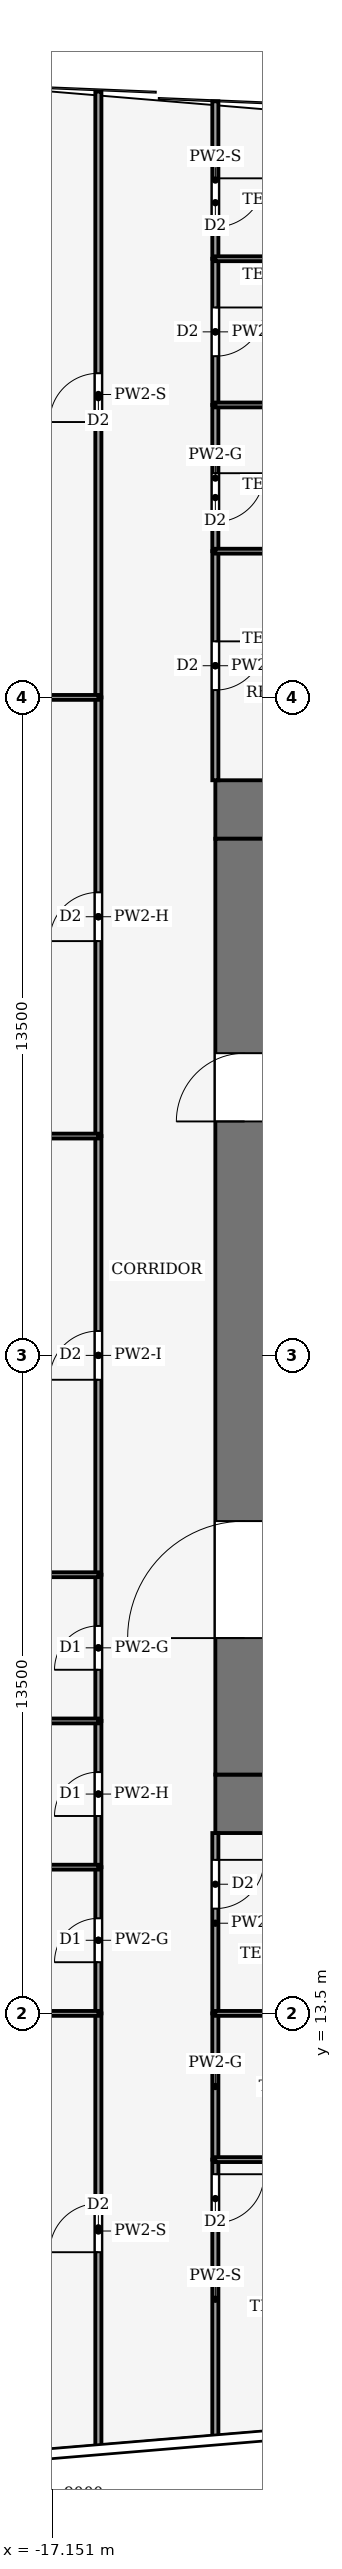
"""IFC4 building model, lengths in metres.
Left out: names, types, materials, properties, quantities, classifications, styles, units other than length and angle.
Written with IfcOpenShell. Run it as: python <this file> out.ifc"""

import sys

from ifc_helpers import new_model, si_unit, direction, frame, frame_2d, origin, place, context, subcontext, project, spatial, rectangle, extrude, element, fill, save


model = new_model("IFC4")
c1 = context("Model", 3, precision=1e-05, world=origin(), true_north=direction((0.0, 1.0)))
c2 = subcontext(c1, "Body", "Model", "MODEL_VIEW")
j1 = project(units=[si_unit("LENGTHUNIT", "METRE"), si_unit("PLANEANGLEUNIT", "RADIAN")], contexts=[c1])
p1 = place(None, origin())
s1 = spatial("IfcSite", under=j1, at=p1, CompositionType="ELEMENT")
p2 = place(p1, origin())
s2 = spatial("IfcBuilding", under=s1, at=p2, CompositionType="ELEMENT")
p3 = place(p2, frame((0.0, 0.0, 106.0)))
s3 = spatial("IfcBuildingStorey", under=s2, at=p3, CompositionType="ELEMENT", Elevation=106.0)
for number, where, z_axis, x_axis in (
    (1, (-13.8, 17.8, -0.13), (0.0, 0.0, 1.0), (1.0, 0.0, 0.0)),
    (2, (-13.8, 38.2, -0.13), (0.0, 0.0, 1.0), (1.0, 0.0, 0.0)),
):
    element("IfcWall", number, at=place(p3, frame(where, z_axis=z_axis, x_axis=x_axis)), inside=s3, PredefinedType="SHEAR", context=c2, shape_type="SweptSolid", body=[
        extrude(rectangle(XDim=27.6, YDim=1.2, at=frame_2d((13.8, 0.0))), origin(), (0.0, 0.0, 1.0), 4.0),
    ])
p4 = place(p3, frame((-13.2, 18.4, -0.13), z_axis=(0.0, 0.0, 1.0), x_axis=(0.0, 1.0, 0.0)))
e3 = element("IfcWall", 3, at=p4, inside=s3, PredefinedType="SHEAR", context=c2, shape_type="SweptSolid", body=[
    extrude(rectangle(XDim=19.2, YDim=1.2, at=frame_2d((9.6, 0.0))), origin(), (0.0, 0.0, 1.0), 4.0),
])
p5 = place(p4, frame((2.8, 0.0, 0.13)))
e4 = element("IfcOpeningElement", 4, at=p5, cuts=e3, PredefinedType="OPENING", context=c2, shape_type="SweptSolid", body=[
    extrude(rectangle(XDim=2.4, YDim=2.4, at=frame_2d((1.2, 1.2))), frame((0.0, 0.61, 0.0), z_axis=(0.0, -1.0, 0.0), x_axis=(1.0, 0.0, 0.0)), (0.0, 0.0, 1.0), 1.22),
])
p6 = place(p4, frame((13.4, 0.0, 0.13)))
e5 = element("IfcOpeningElement", 5, at=p6, cuts=e3, PredefinedType="OPENING", context=c2, shape_type="SweptSolid", body=[
    extrude(rectangle(XDim=1.4, YDim=2.2, at=frame_2d((0.7, 1.1))), frame((0.0, 0.61, 0.0), z_axis=(0.0, -1.0, 0.0), x_axis=(1.0, 0.0, 0.0)), (0.0, 0.0, 1.0), 1.22),
])
p7 = place(p3, frame((-16.2, 4.57, 0.0), z_axis=(0.0, 0.0, 1.0), x_axis=(0.0, 1.0, 0.0)))
e6 = element("IfcWall", 6, at=p7, inside=s3, PredefinedType="PARTITIONING", context=c2, shape_type="SweptSolid", body=[
    extrude(rectangle(XDim=8.93, YDim=0.125, at=frame_2d((4.465, 0.0))), origin(), (0.0, 0.0, 1.0), 3.04),
])
p8 = place(p7, frame((4.03, 0.0, 0.0)))
e7 = element("IfcOpeningElement", 7, at=p8, cuts=e6, PredefinedType="OPENING", context=c2, shape_type="SweptSolid", body=[
    extrude(rectangle(XDim=1.0, YDim=2.1, at=frame_2d((0.5, 1.05))), frame((0.0, 0.073, 0.0), z_axis=(0.0, -1.0, 0.0), x_axis=(1.0, 0.0, 0.0)), (0.0, 0.0, 1.0), 0.145),
])
p9 = place(p3, frame((-16.2, 13.5, 0.0), z_axis=(0.0, 0.0, 1.0), x_axis=(0.0, 1.0, 0.0)))
e8 = element("IfcWall", 8, at=p9, inside=s3, PredefinedType="PARTITIONING", context=c2, shape_type="SweptSolid", body=[
    extrude(rectangle(XDim=3.0, YDim=0.125, at=frame_2d((1.5, 0.0))), origin(), (0.0, 0.0, 1.0), 3.87),
])
p10 = place(p9, frame((1.05, 0.0, 0.0)))
e9 = element("IfcOpeningElement", 9, at=p10, cuts=e8, PredefinedType="OPENING", context=c2, shape_type="SweptSolid", body=[
    extrude(rectangle(XDim=0.9, YDim=2.1, at=frame_2d((0.45, 1.05))), frame((0.0, 0.073, 0.0), z_axis=(0.0, -1.0, 0.0), x_axis=(1.0, 0.0, 0.0)), (0.0, 0.0, 1.0), 0.145),
])
p11 = place(p3, frame((-16.2, 16.5, 0.0), z_axis=(0.0, 0.0, 1.0), x_axis=(0.0, 1.0, 0.0)))
e10 = element("IfcWall", 10, at=p11, inside=s3, PredefinedType="PARTITIONING", context=c2, shape_type="SweptSolid", body=[
    extrude(rectangle(XDim=3.0, YDim=0.125, at=frame_2d((1.5, 0.0))), origin(), (0.0, 0.0, 1.0), 3.14),
])
p12 = place(p11, frame((1.05, 0.0, 0.0)))
e11 = element("IfcOpeningElement", 11, at=p12, cuts=e10, PredefinedType="OPENING", context=c2, shape_type="SweptSolid", body=[
    extrude(rectangle(XDim=0.9, YDim=2.1, at=frame_2d((0.45, 1.05))), frame((0.0, 0.073, 0.0), z_axis=(0.0, -1.0, 0.0), x_axis=(1.0, 0.0, 0.0)), (0.0, 0.0, 1.0), 0.145),
])
p13 = place(p3, frame((-16.2, 19.5, 0.0), z_axis=(0.0, 0.0, 1.0), x_axis=(0.0, 1.0, 0.0)))
e12 = element("IfcWall", 12, at=p13, inside=s3, PredefinedType="PARTITIONING", context=c2, shape_type="SweptSolid", body=[
    extrude(rectangle(XDim=3.0, YDim=0.125, at=frame_2d((1.5, 0.0))), origin(), (0.0, 0.0, 1.0), 3.87),
])
p14 = place(p13, frame((1.05, 0.0, 0.0)))
e13 = element("IfcOpeningElement", 13, at=p14, cuts=e12, PredefinedType="OPENING", context=c2, shape_type="SweptSolid", body=[
    extrude(rectangle(XDim=0.9, YDim=2.1, at=frame_2d((0.45, 1.05))), frame((0.0, 0.073, 0.0), z_axis=(0.0, -1.0, 0.0), x_axis=(1.0, 0.0, 0.0)), (0.0, 0.0, 1.0), 0.145),
])
p15 = place(p3, frame((-16.2, 22.5, 0.0), z_axis=(0.0, 0.0, 1.0), x_axis=(0.0, 1.0, 0.0)))
e14 = element("IfcWall", 14, at=p15, inside=s3, PredefinedType="PARTITIONING", context=c2, shape_type="SweptSolid", body=[
    extrude(rectangle(XDim=9.0, YDim=0.125, at=frame_2d((4.5, 0.0))), origin(), (0.0, 0.0, 1.0), 3.48),
])
p16 = place(p15, frame((4.0, 0.0, 0.0)))
e15 = element("IfcOpeningElement", 15, at=p16, cuts=e14, PredefinedType="OPENING", context=c2, shape_type="SweptSolid", body=[
    extrude(rectangle(XDim=1.0, YDim=2.1, at=frame_2d((0.5, 1.05))), frame((0.0, 0.073, 0.0), z_axis=(0.0, -1.0, 0.0), x_axis=(1.0, 0.0, 0.0)), (0.0, 0.0, 1.0), 0.145),
])
p17 = place(p3, frame((-16.2, 31.5, 0.0), z_axis=(0.0, 0.0, 1.0), x_axis=(0.0, 1.0, 0.0)))
e16 = element("IfcWall", 16, at=p17, inside=s3, PredefinedType="PARTITIONING", context=c2, shape_type="SweptSolid", body=[
    extrude(rectangle(XDim=9.0, YDim=0.125, at=frame_2d((4.5, 0.0))), origin(), (0.0, 0.0, 1.0), 3.14),
])
p18 = place(p17, frame((4.0, 0.0, 0.0)))
e17 = element("IfcOpeningElement", 17, at=p18, cuts=e16, PredefinedType="OPENING", context=c2, shape_type="SweptSolid", body=[
    extrude(rectangle(XDim=1.0, YDim=2.1, at=frame_2d((0.5, 1.05))), frame((0.0, 0.073, 0.0), z_axis=(0.0, -1.0, 0.0), x_axis=(1.0, 0.0, 0.0)), (0.0, 0.0, 1.0), 0.145),
])
p19 = place(p3, frame((-16.2, 40.5, 0.0), z_axis=(0.0, 0.0, 1.0), x_axis=(0.0, 1.0, 0.0)))
e18 = element("IfcWall", 18, at=p19, inside=s3, PredefinedType="PARTITIONING", context=c2, shape_type="SweptSolid", body=[
    extrude(rectangle(XDim=12.43, YDim=0.125, at=frame_2d((6.215, 0.0))), origin(), (0.0, 0.0, 1.0), 3.04),
])
p20 = place(p19, frame((5.65, 0.0, 0.0)))
e19 = element("IfcOpeningElement", 19, at=p20, cuts=e18, PredefinedType="OPENING", context=c2, shape_type="SweptSolid", body=[
    extrude(rectangle(XDim=1.0, YDim=2.1, at=frame_2d((0.5, 1.05))), frame((0.0, 0.073, 0.0), z_axis=(0.0, -1.0, 0.0), x_axis=(1.0, 0.0, 0.0)), (0.0, 0.0, 1.0), 0.145),
])
p21 = place(p3, frame((-13.8, 10.5, 0.0), z_axis=(0.0, 0.0, 1.0), x_axis=(0.0, -1.0, 0.0)))
e20 = element("IfcWall", 20, at=p21, inside=s3, PredefinedType="PARTITIONING", context=c2, shape_type="SweptSolid", body=[
    extrude(rectangle(XDim=5.73, YDim=0.125, at=frame_2d((2.865, 0.0))), origin(), (0.0, 0.0, 1.0), 3.04),
])
p22 = place(p21, frame((0.3, 0.0, 0.0)))
e21 = element("IfcOpeningElement", 21, at=p22, cuts=e20, PredefinedType="OPENING", context=c2, shape_type="SweptSolid", body=[
    extrude(rectangle(XDim=1.0, YDim=2.1, at=frame_2d((0.5, 1.05))), frame((0.0, 0.073, 0.0), z_axis=(0.0, -1.0, 0.0), x_axis=(1.0, 0.0, 0.0)), (0.0, 0.0, 1.0), 0.145),
])
p23 = place(p3, frame((-13.8, 10.5, 0.0), z_axis=(0.0, 0.0, 1.0), x_axis=(0.0, 1.0, 0.0)))
e22 = element("IfcWall", 22, at=p23, inside=s3, PredefinedType="PARTITIONING", context=c2, shape_type="SweptSolid", body=[
    extrude(rectangle(XDim=3.0, YDim=0.125, at=frame_2d((1.5, 0.0))), origin(), (0.0, 0.0, 1.0), 3.87),
])
p24 = place(p3, frame((-13.8, 17.2, 0.0), z_axis=(0.0, 0.0, 1.0), x_axis=(0.0, -1.0, 0.0)))
e23 = element("IfcWall", 23, at=p24, inside=s3, PredefinedType="PARTITIONING", context=c2, shape_type="SweptSolid", body=[
    extrude(rectangle(XDim=3.7, YDim=0.125, at=frame_2d((1.85, 0.0))), origin(), (0.0, 0.0, 1.0), 3.14),
])
p25 = place(p24, frame((0.55, 0.0, 0.0)))
e24 = element("IfcOpeningElement", 24, at=p25, cuts=e23, PredefinedType="OPENING", context=c2, shape_type="SweptSolid", body=[
    extrude(rectangle(XDim=1.0, YDim=2.1, at=frame_2d((0.5, 1.05))), frame((0.0, 0.073, 0.0), z_axis=(0.0, -1.0, 0.0), x_axis=(1.0, 0.0, 0.0)), (0.0, 0.0, 1.0), 0.145),
])
p26 = place(p3, frame((-13.8, 43.5, 0.0), z_axis=(0.0, 0.0, 1.0), x_axis=(0.0, -1.0, 0.0)))
e25 = element("IfcWall", 25, at=p26, inside=s3, PredefinedType="PARTITIONING", context=c2, shape_type="SweptSolid", body=[
    extrude(rectangle(XDim=4.7, YDim=0.125, at=frame_2d((2.35, 0.0))), origin(), (0.0, 0.0, 1.0), 3.14),
])
p27 = place(p26, frame((1.85, 0.0, 0.0)))
e26 = element("IfcOpeningElement", 26, at=p27, cuts=e25, PredefinedType="OPENING", context=c2, shape_type="SweptSolid", body=[
    extrude(rectangle(XDim=1.0, YDim=2.1, at=frame_2d((0.5, 1.05))), frame((0.0, 0.073, 0.0), z_axis=(0.0, -1.0, 0.0), x_axis=(1.0, 0.0, 0.0)), (0.0, 0.0, 1.0), 0.145),
])
p28 = place(p3, frame((-13.8, 46.5, 0.0), z_axis=(0.0, 0.0, 1.0), x_axis=(0.0, -1.0, 0.0)))
e27 = element("IfcWall", 27, at=p28, inside=s3, PredefinedType="PARTITIONING", context=c2, shape_type="SweptSolid", body=[
    extrude(rectangle(XDim=3.0, YDim=0.125, at=frame_2d((1.5, 0.0))), origin(), (0.0, 0.0, 1.0), 3.87),
])
p29 = place(p28, frame((1.4, 0.0, 0.0)))
e28 = element("IfcOpeningElement", 28, at=p29, cuts=e27, PredefinedType="OPENING", context=c2, shape_type="SweptSolid", body=[
    extrude(rectangle(XDim=1.0, YDim=2.1, at=frame_2d((0.5, 1.05))), frame((0.0, 0.073, 0.0), z_axis=(0.0, -1.0, 0.0), x_axis=(1.0, 0.0, 0.0)), (0.0, 0.0, 1.0), 0.145),
])
p30 = place(p3, frame((-13.8, 49.5, 0.0), z_axis=(0.0, 0.0, 1.0), x_axis=(0.0, -1.0, 0.0)))
e29 = element("IfcWall", 29, at=p30, inside=s3, PredefinedType="PARTITIONING", context=c2, shape_type="SweptSolid", body=[
    extrude(rectangle(XDim=3.0, YDim=0.125, at=frame_2d((1.5, 0.0))), origin(), (0.0, 0.0, 1.0), 3.87),
])
p31 = place(p30, frame((1.0, 0.0, 0.0)))
e30 = element("IfcOpeningElement", 30, at=p31, cuts=e29, PredefinedType="OPENING", context=c2, shape_type="SweptSolid", body=[
    extrude(rectangle(XDim=1.0, YDim=2.1, at=frame_2d((0.5, 1.05))), frame((0.0, 0.073, 0.0), z_axis=(0.0, -1.0, 0.0), x_axis=(1.0, 0.0, 0.0)), (0.0, 0.0, 1.0), 0.145),
])
p32 = place(p3, frame((-13.8, 52.73, 0.0), z_axis=(0.0, 0.0, 1.0), x_axis=(0.0, -1.0, 0.0)))
e31 = element("IfcWall", 31, at=p32, inside=s3, PredefinedType="PARTITIONING", context=c2, shape_type="SweptSolid", body=[
    extrude(rectangle(XDim=3.23, YDim=0.125, at=frame_2d((1.615, 0.0))), origin(), (0.0, 0.0, 1.0), 3.04),
])
p33 = place(p32, frame((1.58, 0.0, 0.0)))
e32 = element("IfcOpeningElement", 32, at=p33, cuts=e31, PredefinedType="OPENING", context=c2, shape_type="SweptSolid", body=[
    extrude(rectangle(XDim=1.0, YDim=2.1, at=frame_2d((0.5, 1.05))), frame((0.0, 0.073, 0.0), z_axis=(0.0, -1.0, 0.0), x_axis=(1.0, 0.0, 0.0)), (0.0, 0.0, 1.0), 0.145),
])
p34 = place(p3, frame((-16.2, 13.5, 0.0), z_axis=(0.0, 0.0, 1.0), x_axis=(-1.0, 0.0, 0.0)))
e33 = element("IfcWall", 33, at=p34, inside=s3, PredefinedType="PARTITIONING", context=c2, shape_type="SweptSolid", body=[
    extrude(rectangle(XDim=7.634, YDim=0.1, at=frame_2d((3.817, 0.0))), origin(), (0.0, 0.0, 1.0), 3.04),
])
p35 = place(p3, frame((-16.2, 16.5, 0.0), z_axis=(0.0, 0.0, 1.0), x_axis=(-1.0, 0.0, 0.0)))
e34 = element("IfcWall", 34, at=p35, inside=s3, PredefinedType="PARTITIONING", context=c2, shape_type="SweptSolid", body=[
    extrude(rectangle(XDim=7.387, YDim=0.1, at=frame_2d((3.693, 0.0))), origin(), (0.0, 0.0, 1.0), 3.04),
])
p36 = place(p3, frame((-16.2, 19.5, 0.0), z_axis=(0.0, 0.0, 1.0), x_axis=(-1.0, 0.0, 0.0)))
e35 = element("IfcWall", 35, at=p36, inside=s3, PredefinedType="PARTITIONING", context=c2, shape_type="SweptSolid", body=[
    extrude(rectangle(XDim=7.14, YDim=0.1, at=frame_2d((3.57, 0.0))), origin(), (0.0, 0.0, 1.0), 3.04),
])
p37 = place(p3, frame((-16.2, 22.5, 0.0), z_axis=(0.0, 0.0, 1.0), x_axis=(-1.0, 0.0, 0.0)))
e36 = element("IfcWall", 36, at=p37, inside=s3, PredefinedType="PARTITIONING", context=c2, shape_type="SweptSolid", body=[
    extrude(rectangle(XDim=6.894, YDim=0.1, at=frame_2d((3.447, 0.0))), origin(), (0.0, 0.0, 1.0), 3.04),
])
p38 = place(p3, frame((-16.2, 31.5, 0.0), z_axis=(0.0, 0.0, 1.0), x_axis=(-1.0, 0.0, 0.0)))
e37 = element("IfcWall", 37, at=p38, inside=s3, PredefinedType="PARTITIONING", context=c2, shape_type="SweptSolid", body=[
    extrude(rectangle(XDim=6.606, YDim=0.1, at=frame_2d((3.303, 0.0))), origin(), (0.0, 0.0, 1.0), 3.04),
])
p39 = place(p3, frame((-16.2, 40.5, 0.0), z_axis=(0.0, 0.0, 1.0), x_axis=(-1.0, 0.0, 0.0)))
e38 = element("IfcWall", 38, at=p39, inside=s3, PredefinedType="PARTITIONING", context=c2, shape_type="SweptSolid", body=[
    extrude(rectangle(XDim=7.346, YDim=0.1, at=frame_2d((3.673, 0.0))), origin(), (0.0, 0.0, 1.0), 3.04),
])
p40 = place(p3, frame((-13.8, 10.5, 0.0), z_axis=(0.0, 0.0, 1.0), x_axis=(1.0, 0.0, 0.0)))
e39 = element("IfcWall", 39, at=p40, inside=s3, PredefinedType="PARTITIONING", context=c2, shape_type="SweptSolid", body=[
    extrude(rectangle(XDim=6.3, YDim=0.1, at=frame_2d((3.15, 0.0))), origin(), (0.0, 0.0, 1.0), 3.39),
])
p41 = place(p40, frame((2.65, 0.0, 0.0)))
e40 = element("IfcOpeningElement", 40, at=p41, cuts=e39, PredefinedType="OPENING", context=c2, shape_type="SweptSolid", body=[
    extrude(rectangle(XDim=1.0, YDim=2.1, at=frame_2d((0.5, 1.05))), frame((0.0, 0.06, 0.0), z_axis=(0.0, -1.0, 0.0), x_axis=(1.0, 0.0, 0.0)), (0.0, 0.0, 1.0), 0.12),
])
p42 = place(p3, frame((-7.5, 13.5, 0.0), z_axis=(0.0, 0.0, 1.0), x_axis=(-1.0, 0.0, 0.0)))
e41 = element("IfcWall", 41, at=p42, inside=s3, PredefinedType="PARTITIONING", context=c2, shape_type="SweptSolid", body=[
    extrude(rectangle(XDim=6.3, YDim=0.1, at=frame_2d((3.15, 0.0))), origin(), (0.0, 0.0, 1.0), 3.39),
])
for number, where, z_axis, x_axis in (
    (42, (-10.5, 43.5, 0.0), (0.0, 0.0, 1.0), (-1.0, 0.0, 0.0)),
    (43, (-10.5, 46.5, 0.0), (0.0, 0.0, 1.0), (-1.0, 0.0, 0.0)),
    (44, (-10.5, 49.5, 0.0), (0.0, 0.0, 1.0), (-1.0, 0.0, 0.0)),
):
    element("IfcWall", number, at=place(p3, frame(where, z_axis=z_axis, x_axis=x_axis)), inside=s3, PredefinedType="PARTITIONING", context=c2, shape_type="SweptSolid", body=[
        extrude(rectangle(XDim=3.3, YDim=0.1, at=frame_2d((1.65, 0.0))), origin(), (0.0, 0.0, 1.0), 3.39),
    ])
p43 = place(p5, origin())
e45 = element("IfcDoor", 45, at=p43, inside=s3, OperationType="DOUBLE_DOOR_SINGLE_SWING", PredefinedType="DOOR", context=c2, shape_type="SweptSolid", body=[
    extrude(rectangle(XDim=2.4, YDim=2.4, at=frame_2d((1.2, 1.2))), frame((0.0, 0.025, 0.0), z_axis=(0.0, -1.0, 0.0), x_axis=(1.0, 0.0, 0.0)), (0.0, 0.0, 1.0), 0.05),
])
fill(e4, e45)
p44 = place(p6, origin())
e46 = element("IfcDoor", 46, at=p44, inside=s3, OperationType="SINGLE_SWING_RIGHT", PredefinedType="DOOR", context=c2, shape_type="SweptSolid", body=[
    extrude(rectangle(XDim=1.4, YDim=2.2, at=frame_2d((0.7, 1.1))), frame((0.0, 0.025, 0.0), z_axis=(0.0, -1.0, 0.0), x_axis=(1.0, 0.0, 0.0)), (0.0, 0.0, 1.0), 0.05),
])
fill(e5, e46)
p45 = place(p8, origin())
e47 = element("IfcDoor", 47, at=p45, inside=s3, OperationType="SINGLE_SWING_RIGHT", PredefinedType="DOOR", context=c2, shape_type="SweptSolid", body=[
    extrude(rectangle(XDim=1.0, YDim=2.1, at=frame_2d((0.5, 1.05))), frame((0.0, 0.025, 0.0), z_axis=(0.0, -1.0, 0.0), x_axis=(1.0, 0.0, 0.0)), (0.0, 0.0, 1.0), 0.05),
])
fill(e7, e47)
p46 = place(p10, origin())
e48 = element("IfcDoor", 48, at=p46, inside=s3, OperationType="SINGLE_SWING_RIGHT", PredefinedType="DOOR", context=c2, shape_type="SweptSolid", body=[
    extrude(rectangle(XDim=0.9, YDim=2.1, at=frame_2d((0.45, 1.05))), frame((0.0, 0.025, 0.0), z_axis=(0.0, -1.0, 0.0), x_axis=(1.0, 0.0, 0.0)), (0.0, 0.0, 1.0), 0.05),
])
fill(e9, e48)
p47 = place(p12, origin())
e49 = element("IfcDoor", 49, at=p47, inside=s3, OperationType="SINGLE_SWING_LEFT", PredefinedType="DOOR", context=c2, shape_type="SweptSolid", body=[
    extrude(rectangle(XDim=0.9, YDim=2.1, at=frame_2d((0.45, 1.05))), frame((0.0, 0.025, 0.0), z_axis=(0.0, -1.0, 0.0), x_axis=(1.0, 0.0, 0.0)), (0.0, 0.0, 1.0), 0.05),
])
fill(e11, e49)
p48 = place(p14, origin())
e50 = element("IfcDoor", 50, at=p48, inside=s3, OperationType="SINGLE_SWING_RIGHT", PredefinedType="DOOR", context=c2, shape_type="SweptSolid", body=[
    extrude(rectangle(XDim=0.9, YDim=2.1, at=frame_2d((0.45, 1.05))), frame((0.0, 0.025, 0.0), z_axis=(0.0, -1.0, 0.0), x_axis=(1.0, 0.0, 0.0)), (0.0, 0.0, 1.0), 0.05),
])
fill(e13, e50)
p49 = place(p16, origin())
e51 = element("IfcDoor", 51, at=p49, inside=s3, OperationType="SINGLE_SWING_LEFT", PredefinedType="DOOR", context=c2, shape_type="SweptSolid", body=[
    extrude(rectangle(XDim=1.0, YDim=2.1, at=frame_2d((0.5, 1.05))), frame((0.0, 0.025, 0.0), z_axis=(0.0, -1.0, 0.0), x_axis=(1.0, 0.0, 0.0)), (0.0, 0.0, 1.0), 0.05),
])
fill(e15, e51)
p50 = place(p18, origin())
e52 = element("IfcDoor", 52, at=p50, inside=s3, OperationType="SINGLE_SWING_RIGHT", PredefinedType="DOOR", context=c2, shape_type="SweptSolid", body=[
    extrude(rectangle(XDim=1.0, YDim=2.1, at=frame_2d((0.5, 1.05))), frame((0.0, 0.025, 0.0), z_axis=(0.0, -1.0, 0.0), x_axis=(1.0, 0.0, 0.0)), (0.0, 0.0, 1.0), 0.05),
])
fill(e17, e52)
p51 = place(p20, origin())
e53 = element("IfcDoor", 53, at=p51, inside=s3, OperationType="SINGLE_SWING_LEFT", PredefinedType="DOOR", context=c2, shape_type="SweptSolid", body=[
    extrude(rectangle(XDim=1.0, YDim=2.1, at=frame_2d((0.5, 1.05))), frame((0.0, 0.025, 0.0), z_axis=(0.0, -1.0, 0.0), x_axis=(1.0, 0.0, 0.0)), (0.0, 0.0, 1.0), 0.05),
])
fill(e19, e53)
p52 = place(p22, origin())
e54 = element("IfcDoor", 54, at=p52, inside=s3, OperationType="SINGLE_SWING_LEFT", PredefinedType="DOOR", context=c2, shape_type="SweptSolid", body=[
    extrude(rectangle(XDim=1.0, YDim=2.1, at=frame_2d((0.5, 1.05))), frame((0.0, 0.025, 0.0), z_axis=(0.0, -1.0, 0.0), x_axis=(1.0, 0.0, 0.0)), (0.0, 0.0, 1.0), 0.05),
])
fill(e21, e54)
p53 = place(p25, origin())
e55 = element("IfcDoor", 55, at=p53, inside=s3, OperationType="SINGLE_SWING_LEFT", PredefinedType="DOOR", context=c2, shape_type="SweptSolid", body=[
    extrude(rectangle(XDim=1.0, YDim=2.1, at=frame_2d((0.5, 1.05))), frame((0.0, 0.025, 0.0), z_axis=(0.0, -1.0, 0.0), x_axis=(1.0, 0.0, 0.0)), (0.0, 0.0, 1.0), 0.05),
])
fill(e24, e55)
p54 = place(p27, origin())
e56 = element("IfcDoor", 56, at=p54, inside=s3, OperationType="SINGLE_SWING_RIGHT", PredefinedType="DOOR", context=c2, shape_type="SweptSolid", body=[
    extrude(rectangle(XDim=1.0, YDim=2.1, at=frame_2d((0.5, 1.05))), frame((0.0, 0.025, 0.0), z_axis=(0.0, -1.0, 0.0), x_axis=(1.0, 0.0, 0.0)), (0.0, 0.0, 1.0), 0.05),
])
fill(e26, e56)
p55 = place(p29, origin())
e57 = element("IfcDoor", 57, at=p55, inside=s3, OperationType="SINGLE_SWING_RIGHT", PredefinedType="DOOR", context=c2, shape_type="SweptSolid", body=[
    extrude(rectangle(XDim=1.0, YDim=2.1, at=frame_2d((0.5, 1.05))), frame((0.0, 0.025, 0.0), z_axis=(0.0, -1.0, 0.0), x_axis=(1.0, 0.0, 0.0)), (0.0, 0.0, 1.0), 0.05),
])
fill(e28, e57)
p56 = place(p31, origin())
e58 = element("IfcDoor", 58, at=p56, inside=s3, OperationType="SINGLE_SWING_RIGHT", PredefinedType="DOOR", context=c2, shape_type="SweptSolid", body=[
    extrude(rectangle(XDim=1.0, YDim=2.1, at=frame_2d((0.5, 1.05))), frame((0.0, 0.025, 0.0), z_axis=(0.0, -1.0, 0.0), x_axis=(1.0, 0.0, 0.0)), (0.0, 0.0, 1.0), 0.05),
])
fill(e30, e58)
p57 = place(p33, origin())
e59 = element("IfcDoor", 59, at=p57, inside=s3, OperationType="SINGLE_SWING_RIGHT", PredefinedType="DOOR", context=c2, shape_type="SweptSolid", body=[
    extrude(rectangle(XDim=1.0, YDim=2.1, at=frame_2d((0.5, 1.05))), frame((0.0, 0.025, 0.0), z_axis=(0.0, -1.0, 0.0), x_axis=(1.0, 0.0, 0.0)), (0.0, 0.0, 1.0), 0.05),
])
fill(e32, e59)
save(model, sys.argv[1])
